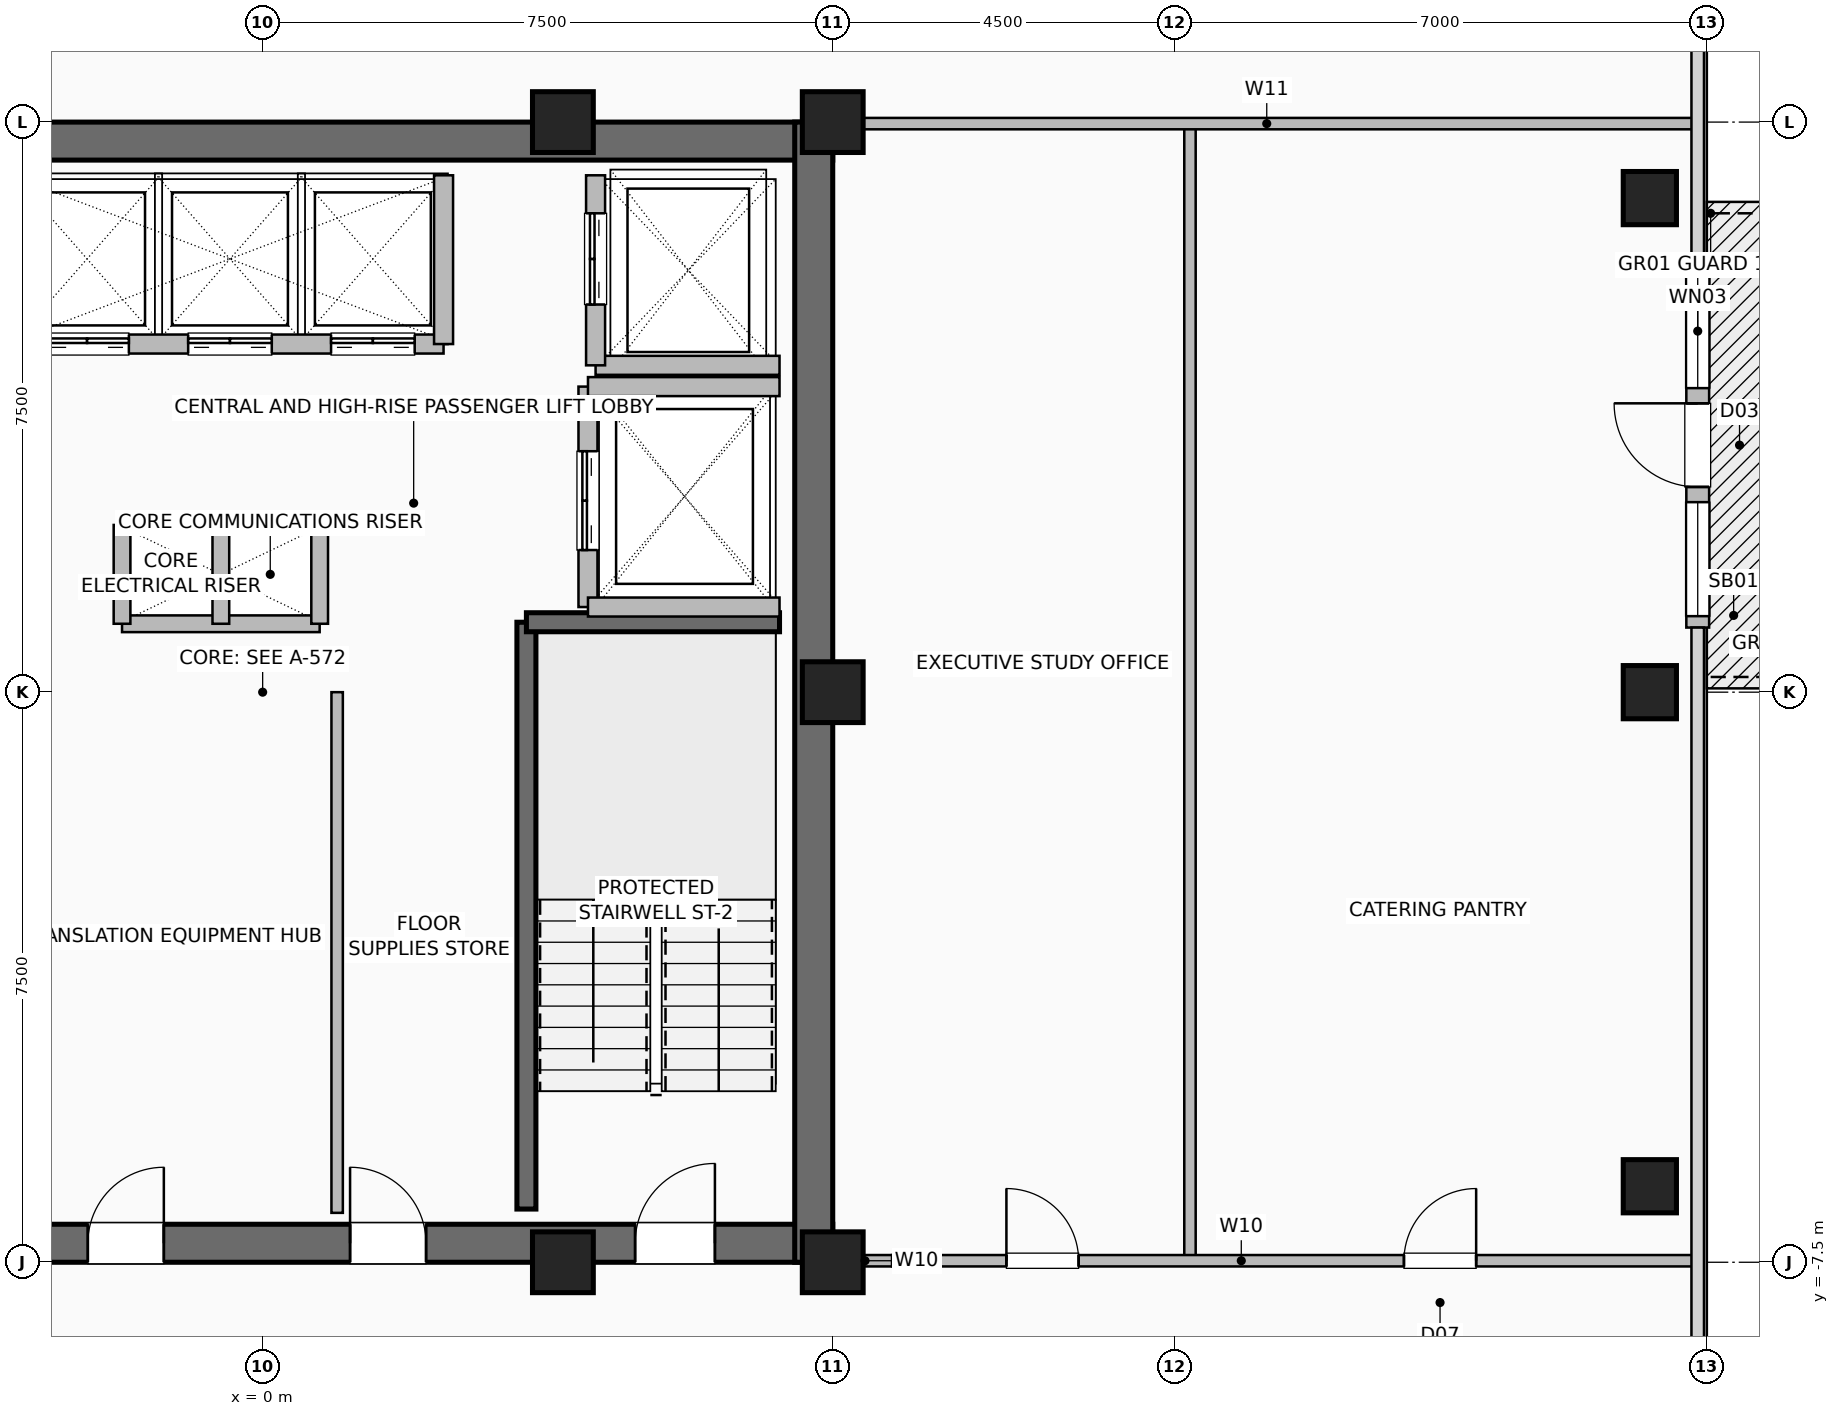
"""IFC4 building model, lengths in metres.
Left out: names, types, materials, properties, quantities, classifications, styles, units other than length and angle.
Written with IfcOpenShell. Run it as: python <this file> out.ifc"""

import sys

from ifc_helpers import new_model, si_unit, direction, frame, frame_2d, origin, origin_2d, place, context, subcontext, project, spatial, rectangle, hollow_rectangle, extrude, element, fill, save


model = new_model("IFC4")
c1 = context("Model", 3, precision=1e-05, world=origin(), true_north=direction((0.0, 1.0)))
c2 = subcontext(c1, "Body", "Model", "MODEL_VIEW")
j1 = project(units=[si_unit("LENGTHUNIT", "METRE"), si_unit("PLANEANGLEUNIT", "RADIAN")], contexts=[c1])
p1 = place(None, origin())
s1 = spatial("IfcSite", under=j1, at=p1, CompositionType="ELEMENT")
p2 = place(p1, origin())
s2 = spatial("IfcBuilding", under=s1, at=p2, CompositionType="ELEMENT")
p3 = place(p2, frame((0.0, 0.0, 286.4)))
s3 = spatial("IfcBuildingStorey", under=s2, at=p3, CompositionType="ELEMENT", Elevation=286.4)
for number, where, z_axis, x_axis in (
    (1, (3.95, -7.5, 0.0), (0.0, 0.0, 1.0), (1.0, 0.0, 0.0)),
    (2, (7.5, -7.5, 0.0), (0.0, 0.0, 1.0), (1.0, 0.0, 0.0)),
    (3, (7.5, 0.0, 0.0), (0.0, 0.0, 1.0), (1.0, 0.0, 0.0)),
    (4, (7.5, 7.5, 0.0), (0.0, 0.0, 1.0), (1.0, 0.0, 0.0)),
    (5, (3.95, 7.5, 0.0), (0.0, 0.0, 1.0), (1.0, 0.0, 0.0)),
):
    element("IfcColumn", number, at=place(p3, frame(where, z_axis=z_axis, x_axis=x_axis)), inside=s3, PredefinedType="COLUMN", context=c2, shape_type="SweptSolid", body=[
        extrude(hollow_rectangle(XDim=0.8, YDim=0.8, WallThickness=0.04, at=origin_2d()), origin(), (0.0, 0.0, 1.0), 3.6),
    ])
for number, where, z_axis, x_axis in (
    (6, (18.25, -6.5, 0.0), (0.0, 0.0, 1.0), (1.0, 0.0, 0.0)),
    (7, (18.25, 0.0, 0.0), (0.0, 0.0, 1.0), (1.0, 0.0, 0.0)),
    (8, (18.25, 6.5, 0.0), (0.0, 0.0, 1.0), (1.0, 0.0, 0.0)),
):
    element("IfcColumn", number, at=place(p3, frame(where, z_axis=z_axis, x_axis=x_axis)), inside=s3, PredefinedType="COLUMN", context=c2, shape_type="SweptSolid", body=[
        extrude(hollow_rectangle(XDim=0.7, YDim=0.7, WallThickness=0.035, at=origin_2d()), origin(), (0.0, 0.0, 1.0), 3.6),
    ])
p4 = place(p3, frame((18.88, 0.85, 0.0), z_axis=(0.0, 0.0, 1.0), x_axis=(0.0, 1.0, 0.0)))
e9 = element("IfcWall", 9, at=p4, inside=s3, PredefinedType="SOLIDWALL", context=c2, shape_type="SweptSolid", body=[
    extrude(rectangle(XDim=4.8, YDim=0.3, at=frame_2d((2.4, 0.0))), origin(), (0.0, 0.0, 1.0), 3.36),
])
p5 = place(p4, frame((1.85, 0.0, 0.0)))
e10 = element("IfcOpeningElement", 10, at=p5, cuts=e9, PredefinedType="OPENING", context=c2, shape_type="SweptSolid", body=[
    extrude(rectangle(XDim=1.1, YDim=2.2, at=frame_2d((0.55, 1.1))), frame((0.0, 0.16, 0.0), z_axis=(0.0, -1.0, 0.0), x_axis=(1.0, 0.0, 0.0)), (0.0, 0.0, 1.0), 0.32),
])
p6 = place(p4, frame((0.15, 0.0, 0.85)))
e11 = element("IfcOpeningElement", 11, at=p6, cuts=e9, PredefinedType="OPENING", context=c2, shape_type="SweptSolid", body=[
    extrude(rectangle(XDim=1.5, YDim=1.8, at=frame_2d((0.75, 0.9))), frame((0.0, 0.16, 0.0), z_axis=(0.0, -1.0, 0.0), x_axis=(1.0, 0.0, 0.0)), (0.0, 0.0, 1.0), 0.32),
])
p7 = place(p4, frame((3.15, 0.0, 0.85)))
e12 = element("IfcOpeningElement", 12, at=p7, cuts=e9, PredefinedType="OPENING", context=c2, shape_type="SweptSolid", body=[
    extrude(rectangle(XDim=1.5, YDim=1.8, at=frame_2d((0.75, 0.9))), frame((0.0, 0.16, 0.0), z_axis=(0.0, -1.0, 0.0), x_axis=(1.0, 0.0, 0.0)), (0.0, 0.0, 1.0), 0.32),
])
p8 = place(p3, frame((-7.5, -7.25, 0.0), z_axis=(0.0, 0.0, 1.0), x_axis=(1.0, 0.0, 0.0)))
e13 = element("IfcWall", 13, at=p8, inside=s3, PredefinedType="SHEAR", context=c2, shape_type="SweptSolid", body=[
    extrude(rectangle(XDim=15.0, YDim=0.5, at=frame_2d((7.5, 0.0))), origin(), (0.0, 0.0, 1.0), 3.36),
])
p9 = place(p8, frame((1.55, 0.0, 0.0)))
e14 = element("IfcOpeningElement", 14, at=p9, cuts=e13, PredefinedType="OPENING", context=c2, shape_type="SweptSolid", body=[
    extrude(rectangle(XDim=1.05, YDim=2.08, at=frame_2d((0.525, 1.04))), frame((0.0, 0.26, 0.0), z_axis=(0.0, -1.0, 0.0), x_axis=(1.0, 0.0, 0.0)), (0.0, 0.0, 1.0), 0.52),
])
p10 = place(p8, frame((12.4, 0.0, 0.0)))
e15 = element("IfcOpeningElement", 15, at=p10, cuts=e13, PredefinedType="OPENING", context=c2, shape_type="SweptSolid", body=[
    extrude(rectangle(XDim=1.05, YDim=2.08, at=frame_2d((0.525, 1.04))), frame((0.0, 0.26, 0.0), z_axis=(0.0, -1.0, 0.0), x_axis=(1.0, 0.0, 0.0)), (0.0, 0.0, 1.0), 0.52),
])
p11 = place(p8, frame((5.2, 0.0, 0.0)))
e16 = element("IfcOpeningElement", 16, at=p11, cuts=e13, PredefinedType="OPENING", context=c2, shape_type="SweptSolid", body=[
    extrude(rectangle(XDim=1.0, YDim=2.08, at=frame_2d((0.5, 1.04))), frame((0.0, 0.26, 0.0), z_axis=(0.0, -1.0, 0.0), x_axis=(1.0, 0.0, 0.0)), (0.0, 0.0, 1.0), 0.52),
])
p12 = place(p8, frame((8.65, 0.0, 0.0)))
e17 = element("IfcOpeningElement", 17, at=p12, cuts=e13, PredefinedType="OPENING", context=c2, shape_type="SweptSolid", body=[
    extrude(rectangle(XDim=1.0, YDim=2.08, at=frame_2d((0.5, 1.04))), frame((0.0, 0.26, 0.0), z_axis=(0.0, -1.0, 0.0), x_axis=(1.0, 0.0, 0.0)), (0.0, 0.0, 1.0), 0.52),
])
for number, where, z_axis, x_axis in (
    (18, (-7.5, 7.25, 0.0), (0.0, 0.0, 1.0), (1.0, 0.0, 0.0)),
    (19, (7.25, -7.5, 0.0), (0.0, 0.0, 1.0), (0.0, 1.0, 0.0)),
):
    element("IfcWall", number, at=place(p3, frame(where, z_axis=z_axis, x_axis=x_axis)), inside=s3, PredefinedType="SHEAR", context=c2, shape_type="SweptSolid", body=[
        extrude(rectangle(XDim=15.0, YDim=0.5, at=frame_2d((7.5, 0.0))), origin(), (0.0, 0.0, 1.0), 3.36),
    ])
p13 = place(p3, frame((3.47, -6.8, 0.0), z_axis=(0.0, 0.0, 1.0), x_axis=(0.0, 1.0, 0.0)))
e20 = element("IfcWall", 20, at=p13, inside=s3, PredefinedType="SHEAR", context=c2, shape_type="SweptSolid", body=[
    extrude(rectangle(XDim=7.72, YDim=0.25, at=frame_2d((3.86, 0.0))), origin(), (0.0, 0.0, 1.0), 3.36),
])
p14 = place(p3, frame((3.47, 0.92, 0.0), z_axis=(0.0, 0.0, 1.0), x_axis=(1.0, 0.0, 0.0)))
e21 = element("IfcWall", 21, at=p14, inside=s3, PredefinedType="SHEAR", context=c2, shape_type="SweptSolid", body=[
    extrude(rectangle(XDim=3.33, YDim=0.25, at=frame_2d((1.665, 0.0))), origin(), (0.0, 0.0, 1.0), 3.36),
])
for number, where, z_axis, x_axis in (
    (22, (-1.85, 2.2, 0.0), (0.0, 0.0, 1.0), (1.0, 0.0, 0.0)),
    (23, (-1.85, 0.9, 0.0), (0.0, 0.0, 1.0), (1.0, 0.0, 0.0)),
):
    element("IfcWall", number, at=place(p3, frame(where, z_axis=z_axis, x_axis=x_axis)), inside=s3, PredefinedType="PARTITIONING", context=c2, shape_type="SweptSolid", body=[
        extrude(rectangle(XDim=2.6, YDim=0.22, at=frame_2d((1.3, 0.0))), origin(), (0.0, 0.0, 1.0), 3.36),
    ])
for number, where, z_axis, x_axis in (
    (24, (-0.55, 0.9, 0.0), (0.0, 0.0, 1.0), (0.0, 1.0, 0.0)),
    (25, (0.75, 0.9, 0.0), (0.0, 0.0, 1.0), (0.0, 1.0, 0.0)),
    (26, (-1.85, 0.9, 0.0), (0.0, 0.0, 1.0), (0.0, 1.0, 0.0)),
):
    element("IfcWall", number, at=place(p3, frame(where, z_axis=z_axis, x_axis=x_axis)), inside=s3, PredefinedType="PARTITIONING", context=c2, shape_type="SweptSolid", body=[
        extrude(rectangle(XDim=1.3, YDim=0.22, at=frame_2d((0.65, 0.0))), origin(), (0.0, 0.0, 1.0), 3.36),
    ])
p15 = place(p3, frame((-3.26, 4.58, 0.0), z_axis=(0.0, 0.0, 1.0), x_axis=(1.0, 0.0, 0.0)))
e27 = element("IfcWall", 27, at=p15, inside=s3, PredefinedType="SHEAR", context=c2, shape_type="SweptSolid", body=[
    extrude(rectangle(XDim=5.64, YDim=0.25, at=frame_2d((2.82, 0.0))), origin(), (0.0, 0.0, 1.0), 3.36),
])
p16 = place(p15, frame((0.4, 0.0, 0.0)))
e28 = element("IfcOpeningElement", 28, at=p16, cuts=e27, PredefinedType="OPENING", context=c2, shape_type="SweptSolid", body=[
    extrude(rectangle(XDim=1.1, YDim=2.2, at=frame_2d((0.55, 1.1))), frame((0.0, 0.135, 0.0), z_axis=(0.0, -1.0, 0.0), x_axis=(1.0, 0.0, 0.0)), (0.0, 0.0, 1.0), 0.27),
])
p17 = place(p15, frame((2.28, 0.0, 0.0)))
e29 = element("IfcOpeningElement", 29, at=p17, cuts=e27, PredefinedType="OPENING", context=c2, shape_type="SweptSolid", body=[
    extrude(rectangle(XDim=1.1, YDim=2.2, at=frame_2d((0.55, 1.1))), frame((0.0, 0.135, 0.0), z_axis=(0.0, -1.0, 0.0), x_axis=(1.0, 0.0, 0.0)), (0.0, 0.0, 1.0), 0.27),
])
p18 = place(p15, frame((4.16, 0.0, 0.0)))
e30 = element("IfcOpeningElement", 30, at=p18, cuts=e27, PredefinedType="OPENING", context=c2, shape_type="SweptSolid", body=[
    extrude(rectangle(XDim=1.1, YDim=2.2, at=frame_2d((0.55, 1.1))), frame((0.0, 0.135, 0.0), z_axis=(0.0, -1.0, 0.0), x_axis=(1.0, 0.0, 0.0)), (0.0, 0.0, 1.0), 0.27),
])
p19 = place(p3, frame((2.38, 4.58, 0.0), z_axis=(0.0, 0.0, 1.0), x_axis=(0.0, 1.0, 0.0)))
e31 = element("IfcWall", 31, at=p19, inside=s3, PredefinedType="SHEAR", context=c2, shape_type="SweptSolid", body=[
    extrude(rectangle(XDim=2.22, YDim=0.25, at=frame_2d((1.11, 0.0))), origin(), (0.0, 0.0, 1.0), 3.36),
])
p20 = place(p3, frame((4.38, 4.3, 0.0), z_axis=(0.0, 0.0, 1.0), x_axis=(1.0, 0.0, 0.0)))
e32 = element("IfcWall", 32, at=p20, inside=s3, PredefinedType="SHEAR", context=c2, shape_type="SweptSolid", body=[
    extrude(rectangle(XDim=2.42, YDim=0.25, at=frame_2d((1.21, 0.0))), origin(), (0.0, 0.0, 1.0), 3.36),
])
p21 = place(p3, frame((4.38, 4.3, 0.0), z_axis=(0.0, 0.0, 1.0), x_axis=(0.0, 1.0, 0.0)))
e33 = element("IfcWall", 33, at=p21, inside=s3, PredefinedType="SHEAR", context=c2, shape_type="SweptSolid", body=[
    extrude(rectangle(XDim=2.5, YDim=0.25, at=frame_2d((1.25, 0.0))), origin(), (0.0, 0.0, 1.0), 3.36),
])
p22 = place(p21, frame((0.8, 0.0, 0.0)))
e34 = element("IfcOpeningElement", 34, at=p22, cuts=e33, PredefinedType="OPENING", context=c2, shape_type="SweptSolid", body=[
    extrude(rectangle(XDim=1.2, YDim=2.2, at=frame_2d((0.6, 1.1))), frame((0.0, 0.135, 0.0), z_axis=(0.0, -1.0, 0.0), x_axis=(1.0, 0.0, 0.0)), (0.0, 0.0, 1.0), 0.27),
])
p23 = place(p3, frame((4.28, 1.12, 0.0), z_axis=(0.0, 0.0, 1.0), x_axis=(0.0, 1.0, 0.0)))
e35 = element("IfcWall", 35, at=p23, inside=s3, PredefinedType="SHEAR", context=c2, shape_type="SweptSolid", body=[
    extrude(rectangle(XDim=2.9, YDim=0.25, at=frame_2d((1.45, 0.0))), origin(), (0.0, 0.0, 1.0), 3.36),
])
p24 = place(p23, frame((0.75, 0.0, 0.0)))
e36 = element("IfcOpeningElement", 36, at=p24, cuts=e35, PredefinedType="OPENING", context=c2, shape_type="SweptSolid", body=[
    extrude(rectangle(XDim=1.3, YDim=2.3, at=frame_2d((0.65, 1.15))), frame((0.0, 0.135, 0.0), z_axis=(0.0, -1.0, 0.0), x_axis=(1.0, 0.0, 0.0)), (0.0, 0.0, 1.0), 0.27),
])
for number, where, z_axis, x_axis in (
    (37, (4.28, 1.12, 0.0), (0.0, 0.0, 1.0), (1.0, 0.0, 0.0)),
    (38, (4.28, 4.02, 0.0), (0.0, 0.0, 1.0), (1.0, 0.0, 0.0)),
):
    element("IfcWall", number, at=place(p3, frame(where, z_axis=z_axis, x_axis=x_axis)), inside=s3, PredefinedType="SHEAR", context=c2, shape_type="SweptSolid", body=[
        extrude(rectangle(XDim=2.52, YDim=0.25, at=frame_2d((1.26, 0.0))), origin(), (0.0, 0.0, 1.0), 3.36),
    ])
p25 = place(p3, frame((0.98, -6.85, 0.0), z_axis=(0.0, 0.0, 1.0), x_axis=(0.0, 1.0, 0.0)))
e39 = element("IfcWall", 39, at=p25, inside=s3, PredefinedType="PARTITIONING", context=c2, shape_type="SweptSolid", body=[
    extrude(rectangle(XDim=6.85, YDim=0.15, at=frame_2d((3.425, 0.0))), origin(), (0.0, 0.0, 1.0), 3.36),
])
p26 = place(p3, frame((7.45, -7.48, 0.0), z_axis=(0.0, 0.0, 1.0), x_axis=(1.0, 0.0, 0.0)))
e40 = element("IfcWall", 40, at=p26, inside=s3, PredefinedType="PARTITIONING", context=c2, shape_type="SweptSolid", body=[
    extrude(rectangle(XDim=0.95, YDim=0.15, at=frame_2d((0.475, 0.0))), origin(), (0.0, 0.0, 1.0), 3.36),
])
p27 = place(p3, frame((12.2, -7.48, 0.0), z_axis=(0.0, 0.0, 1.0), x_axis=(0.0, 1.0, 0.0)))
e41 = element("IfcWall", 41, at=p27, inside=s3, PredefinedType="PARTITIONING", context=c2, shape_type="SweptSolid", body=[
    extrude(rectangle(XDim=14.9, YDim=0.15, at=frame_2d((7.45, 0.0))), origin(), (0.0, 0.0, 1.0), 3.36),
])
p28 = place(p3, frame((8.28, -7.48, 0.0), z_axis=(0.0, 0.0, 1.0), x_axis=(1.0, 0.0, 0.0)))
e42 = element("IfcWall", 42, at=p28, inside=s3, PredefinedType="PARTITIONING", context=c2, shape_type="SweptSolid", body=[
    extrude(rectangle(XDim=10.54, YDim=0.15, at=frame_2d((5.27, 0.0))), origin(), (0.0, 0.0, 1.0), 3.36),
])
p29 = place(p28, frame((1.505, 0.0, 0.0)))
e43 = element("IfcOpeningElement", 43, at=p29, cuts=e42, PredefinedType="OPENING", context=c2, shape_type="SweptSolid", body=[
    extrude(rectangle(XDim=0.95, YDim=2.06, at=frame_2d((0.475, 1.03))), frame((0.0, 0.085, 0.0), z_axis=(0.0, -1.0, 0.0), x_axis=(1.0, 0.0, 0.0)), (0.0, 0.0, 1.0), 0.17),
])
p30 = place(p28, frame((6.735, 0.0, 0.0)))
e44 = element("IfcOpeningElement", 44, at=p30, cuts=e42, PredefinedType="OPENING", context=c2, shape_type="SweptSolid", body=[
    extrude(rectangle(XDim=0.95, YDim=2.06, at=frame_2d((0.475, 1.03))), frame((0.0, 0.085, 0.0), z_axis=(0.0, -1.0, 0.0), x_axis=(1.0, 0.0, 0.0)), (0.0, 0.0, 1.0), 0.17),
])
p31 = place(p3, frame((7.6, 7.48, 0.0), z_axis=(0.0, 0.0, 1.0), x_axis=(1.0, 0.0, 0.0)))
e45 = element("IfcWall", 45, at=p31, inside=s3, PredefinedType="PARTITIONING", context=c2, shape_type="SweptSolid", body=[
    extrude(rectangle(XDim=11.22, YDim=0.15, at=frame_2d((5.61, 0.0))), origin(), (0.0, 0.0, 1.0), 3.36),
])
p32 = place(p5, origin())
e46 = element("IfcDoor", 46, at=p32, inside=s3, OperationType="SINGLE_SWING_RIGHT", PredefinedType="DOOR", context=c2, shape_type="SweptSolid", body=[
    extrude(rectangle(XDim=1.1, YDim=2.2, at=frame_2d((0.55, 1.1))), frame((0.0, 0.025, 0.0), z_axis=(0.0, -1.0, 0.0), x_axis=(1.0, 0.0, 0.0)), (0.0, 0.0, 1.0), 0.05),
])
fill(e10, e46)
p33 = place(p6, origin())
e47 = element("IfcWindow", 47, at=p33, inside=s3, PartitioningType="SINGLE_PANEL", PredefinedType="WINDOW", context=c2, shape_type="SweptSolid", body=[
    extrude(rectangle(XDim=1.5, YDim=1.8, at=frame_2d((0.75, 0.9))), frame((0.0, 0.03, 0.0), z_axis=(0.0, -1.0, 0.0), x_axis=(1.0, 0.0, 0.0)), (0.0, 0.0, 1.0), 0.06),
])
fill(e11, e47)
p34 = place(p7, origin())
e48 = element("IfcWindow", 48, at=p34, inside=s3, PartitioningType="SINGLE_PANEL", PredefinedType="WINDOW", context=c2, shape_type="SweptSolid", body=[
    extrude(rectangle(XDim=1.5, YDim=1.8, at=frame_2d((0.75, 0.9))), frame((0.0, 0.03, 0.0), z_axis=(0.0, -1.0, 0.0), x_axis=(1.0, 0.0, 0.0)), (0.0, 0.0, 1.0), 0.06),
])
fill(e12, e48)
p35 = place(p10, origin())
e49 = element("IfcDoor", 49, at=p35, inside=s3, OperationType="SINGLE_SWING_RIGHT", PredefinedType="DOOR", context=c2, shape_type="SweptSolid", body=[
    extrude(rectangle(XDim=1.05, YDim=2.08, at=frame_2d((0.525, 1.04))), frame((0.0, 0.025, 0.0), z_axis=(0.0, -1.0, 0.0), x_axis=(1.0, 0.0, 0.0)), (0.0, 0.0, 1.0), 0.05),
])
fill(e15, e49)
p36 = place(p11, origin())
e50 = element("IfcDoor", 50, at=p36, inside=s3, OperationType="SINGLE_SWING_RIGHT", PredefinedType="DOOR", context=c2, shape_type="SweptSolid", body=[
    extrude(rectangle(XDim=1.0, YDim=2.08, at=frame_2d((0.5, 1.04))), frame((0.0, 0.025, 0.0), z_axis=(0.0, -1.0, 0.0), x_axis=(1.0, 0.0, 0.0)), (0.0, 0.0, 1.0), 0.05),
])
fill(e16, e50)
p37 = place(p12, origin())
e51 = element("IfcDoor", 51, at=p37, inside=s3, OperationType="SINGLE_SWING_LEFT", PredefinedType="DOOR", context=c2, shape_type="SweptSolid", body=[
    extrude(rectangle(XDim=1.0, YDim=2.08, at=frame_2d((0.5, 1.04))), frame((0.0, 0.025, 0.0), z_axis=(0.0, -1.0, 0.0), x_axis=(1.0, 0.0, 0.0)), (0.0, 0.0, 1.0), 0.05),
])
fill(e17, e51)
p38 = place(p16, origin())
e52 = element("IfcDoor", 52, at=p38, inside=s3, OperationType="DOUBLE_DOOR_SLIDING", PredefinedType="DOOR", context=c2, shape_type="SweptSolid", body=[
    extrude(rectangle(XDim=1.1, YDim=2.2, at=frame_2d((0.55, 1.1))), frame((0.0, 0.025, 0.0), z_axis=(0.0, -1.0, 0.0), x_axis=(1.0, 0.0, 0.0)), (0.0, 0.0, 1.0), 0.05),
])
fill(e28, e52)
p39 = place(p17, origin())
e53 = element("IfcDoor", 53, at=p39, inside=s3, OperationType="DOUBLE_DOOR_SLIDING", PredefinedType="DOOR", context=c2, shape_type="SweptSolid", body=[
    extrude(rectangle(XDim=1.1, YDim=2.2, at=frame_2d((0.55, 1.1))), frame((0.0, 0.025, 0.0), z_axis=(0.0, -1.0, 0.0), x_axis=(1.0, 0.0, 0.0)), (0.0, 0.0, 1.0), 0.05),
])
fill(e29, e53)
p40 = place(p18, origin())
e54 = element("IfcDoor", 54, at=p40, inside=s3, OperationType="DOUBLE_DOOR_SLIDING", PredefinedType="DOOR", context=c2, shape_type="SweptSolid", body=[
    extrude(rectangle(XDim=1.1, YDim=2.2, at=frame_2d((0.55, 1.1))), frame((0.0, 0.025, 0.0), z_axis=(0.0, -1.0, 0.0), x_axis=(1.0, 0.0, 0.0)), (0.0, 0.0, 1.0), 0.05),
])
fill(e30, e54)
p41 = place(p22, origin())
e55 = element("IfcDoor", 55, at=p41, inside=s3, OperationType="DOUBLE_DOOR_SLIDING", PredefinedType="DOOR", context=c2, shape_type="SweptSolid", body=[
    extrude(rectangle(XDim=1.2, YDim=2.2, at=frame_2d((0.6, 1.1))), frame((0.0, 0.025, 0.0), z_axis=(0.0, -1.0, 0.0), x_axis=(1.0, 0.0, 0.0)), (0.0, 0.0, 1.0), 0.05),
])
fill(e34, e55)
p42 = place(p24, origin())
e56 = element("IfcDoor", 56, at=p42, inside=s3, OperationType="DOUBLE_DOOR_SLIDING", PredefinedType="DOOR", context=c2, shape_type="SweptSolid", body=[
    extrude(rectangle(XDim=1.3, YDim=2.3, at=frame_2d((0.65, 1.15))), frame((0.0, 0.025, 0.0), z_axis=(0.0, -1.0, 0.0), x_axis=(1.0, 0.0, 0.0)), (0.0, 0.0, 1.0), 0.05),
])
fill(e36, e56)
p43 = place(p29, origin())
e57 = element("IfcDoor", 57, at=p43, inside=s3, OperationType="SINGLE_SWING_LEFT", PredefinedType="DOOR", context=c2, shape_type="SweptSolid", body=[
    extrude(rectangle(XDim=0.95, YDim=2.06, at=frame_2d((0.475, 1.03))), frame((0.0, 0.025, 0.0), z_axis=(0.0, -1.0, 0.0), x_axis=(1.0, 0.0, 0.0)), (0.0, 0.0, 1.0), 0.05),
])
fill(e43, e57)
p44 = place(p30, origin())
e58 = element("IfcDoor", 58, at=p44, inside=s3, OperationType="SINGLE_SWING_RIGHT", PredefinedType="DOOR", context=c2, shape_type="SweptSolid", body=[
    extrude(rectangle(XDim=0.95, YDim=2.06, at=frame_2d((0.475, 1.03))), frame((0.0, 0.025, 0.0), z_axis=(0.0, -1.0, 0.0), x_axis=(1.0, 0.0, 0.0)), (0.0, 0.0, 1.0), 0.05),
])
fill(e44, e58)
save(model, sys.argv[1])
